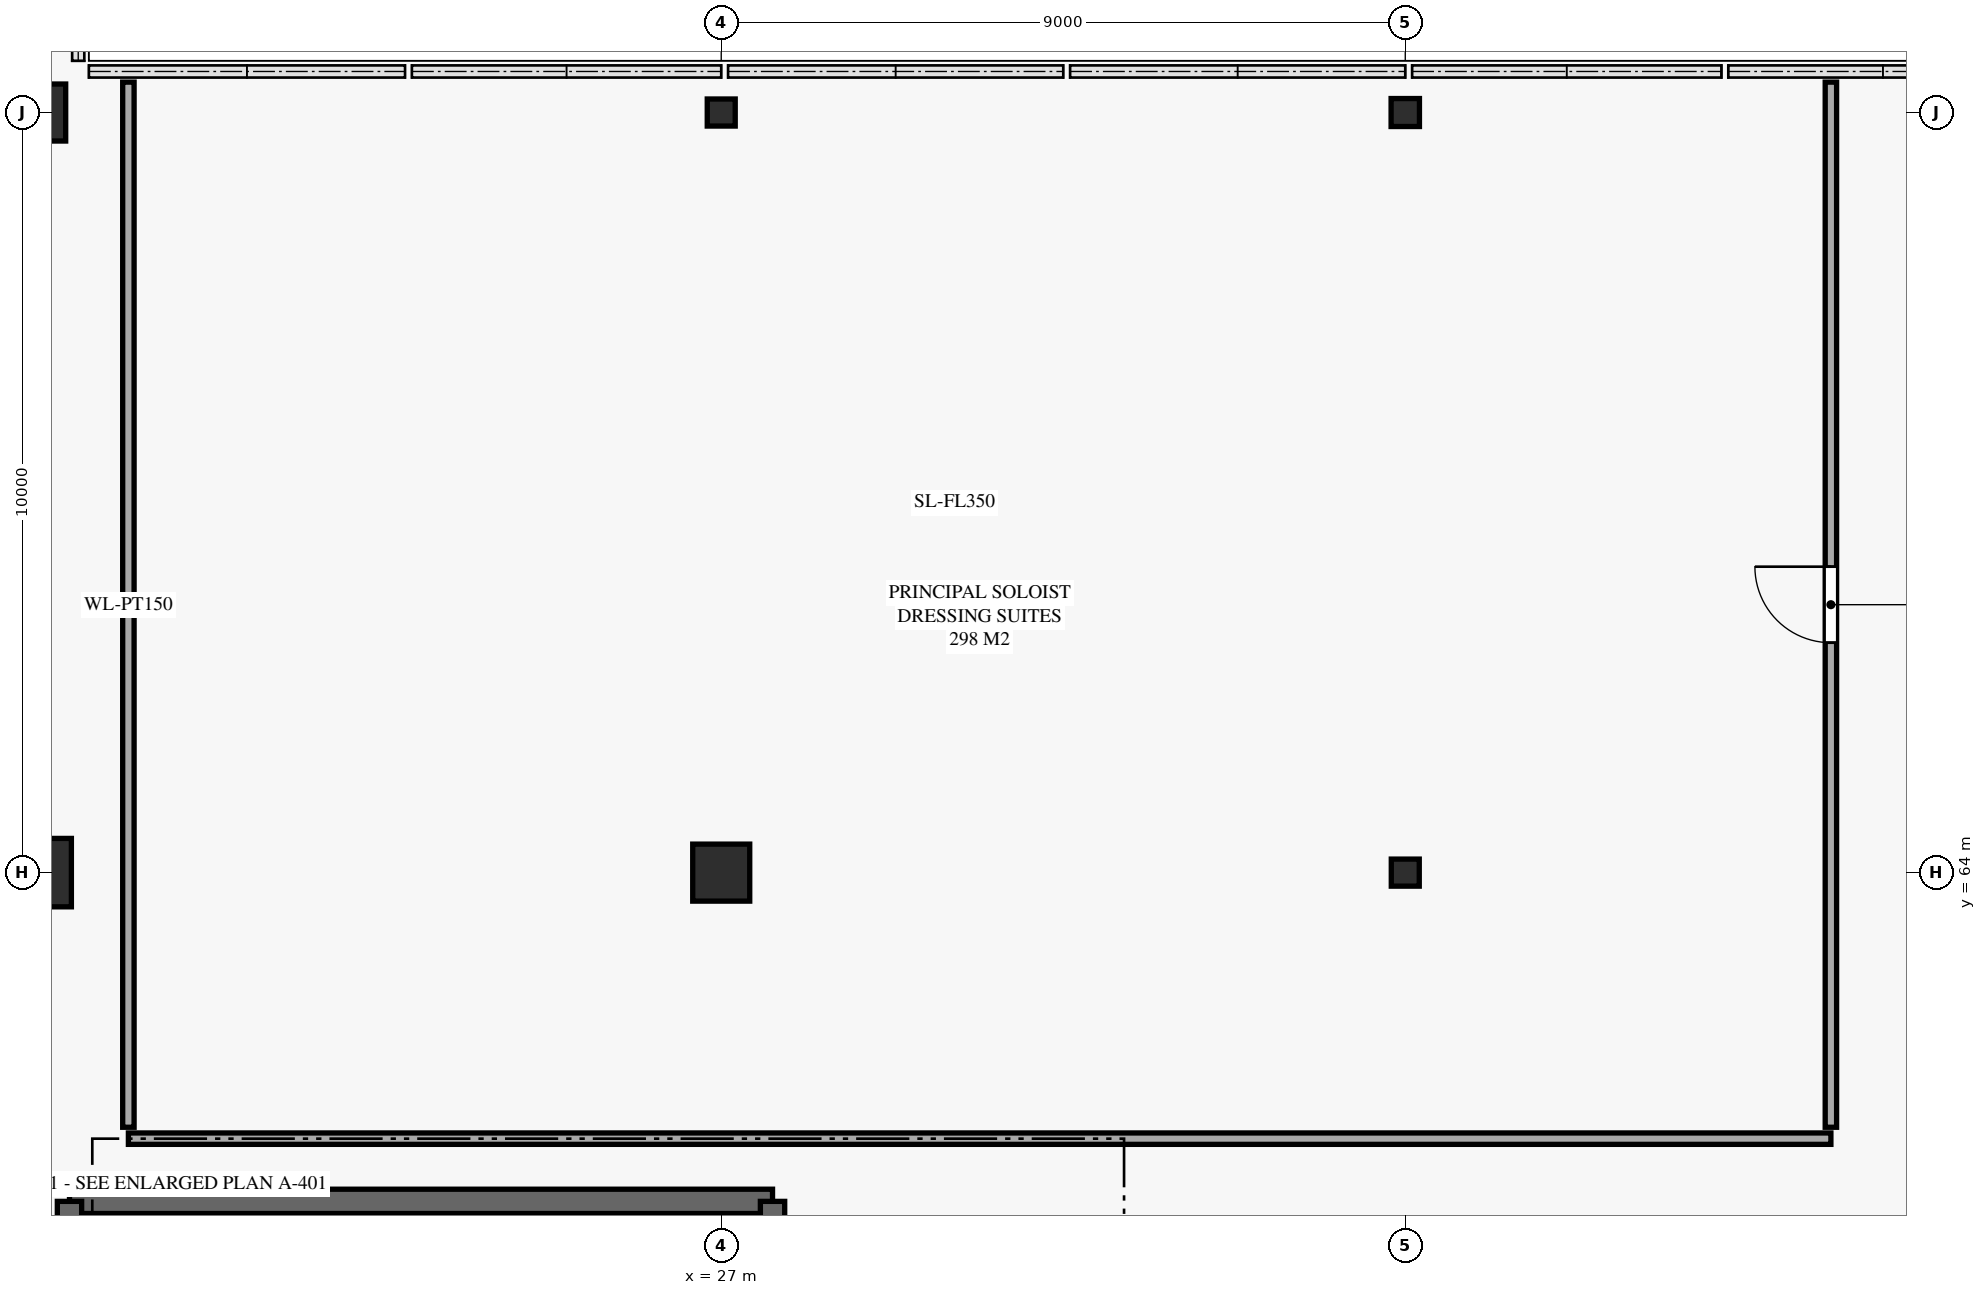
"""IFC4 building model, lengths in metres.
Left out: names, types, materials, properties, quantities, classifications, styles, units other than length and angle.
Written with IfcOpenShell. Run it as: python <this file> out.ifc"""

import sys

from ifc_helpers import new_model, si_unit, direction, frame, frame_2d, origin, origin_2d, place, context, subcontext, project, spatial, rectangle, i_section, extrude, element, fill, save


model = new_model("IFC4")
c1 = context("Model", 3, precision=1e-05, world=origin(), true_north=direction((0.0, 1.0)))
c2 = subcontext(c1, "Body", "Model", "MODEL_VIEW")
j1 = project(units=[si_unit("LENGTHUNIT", "METRE"), si_unit("PLANEANGLEUNIT", "RADIAN")], contexts=[c1])
p1 = place(None, origin())
s1 = spatial("IfcSite", under=j1, at=p1, CompositionType="ELEMENT")
p2 = place(p1, origin())
s2 = spatial("IfcBuilding", under=s1, at=p2, CompositionType="ELEMENT")
p3 = place(p2, origin())
s3 = spatial("IfcBuildingStorey", under=s2, at=p3, CompositionType="ELEMENT", Elevation=0.0)
p4 = place(p3, frame((18.0, 64.0, 0.0), z_axis=(0.0, 0.0, 1.0), x_axis=(1.0, 0.0, 0.0)))
e1 = element("IfcColumn", 1, at=p4, inside=s3, PredefinedType="COLUMN", context=c2, shape_type="SweptSolid", body=[
    extrude(rectangle(XDim=0.9, YDim=0.9, at=origin_2d()), origin(), (0.0, 0.0, 1.0), 5.0),
])
for number, where, z_axis, x_axis in (
    (2, (18.0, 74.0, 0.0), (0.0, 0.0, 1.0), (1.0, 0.0, 0.0)),
    (3, (27.0, 64.0, 0.0), (0.0, 0.0, 1.0), (1.0, 0.0, 0.0)),
):
    element("IfcColumn", number, at=place(p3, frame(where, z_axis=z_axis, x_axis=x_axis)), inside=s3, PredefinedType="COLUMN", context=c2, shape_type="SweptSolid", body=[
        extrude(rectangle(XDim=0.75, YDim=0.75, at=origin_2d()), origin(), (0.0, 0.0, 1.0), 5.0),
    ])
for number, where, z_axis, x_axis in (
    (4, (27.0, 74.0, 0.0), (0.0, 0.0, 1.0), (1.0, 0.0, 0.0)),
    (5, (36.0, 64.0, 0.0), (0.0, 0.0, 1.0), (1.0, 0.0, 0.0)),
):
    element("IfcColumn", number, at=place(p3, frame(where, z_axis=z_axis, x_axis=x_axis)), inside=s3, PredefinedType="COLUMN", context=c2, shape_type="SweptSolid", body=[
        extrude(i_section(OverallWidth=0.368, OverallDepth=0.356, WebThickness=0.011, FlangeThickness=0.018, FilletRadius=0.015, at=origin_2d()), origin(), (0.0, 0.0, 1.0), 5.0),
    ])
p5 = place(p3, frame((36.0, 74.0, 0.0), z_axis=(0.0, 0.0, 1.0), x_axis=(1.0, 0.0, 0.0)))
e6 = element("IfcColumn", 6, at=p5, inside=s3, PredefinedType="COLUMN", context=c2, shape_type="SweptSolid", body=[
    extrude(i_section(OverallWidth=0.373, OverallDepth=0.368, WebThickness=0.015, FlangeThickness=0.024, FilletRadius=0.015, at=origin_2d()), origin(), (0.0, 0.0, 1.0), 5.0),
])
p6 = place(p3, frame((27.675, 59.675, 0.0), z_axis=(0.0, 0.0, 1.0), x_axis=(-1.0, 0.0, 0.0)))
e7 = element("IfcWall", 7, at=p6, inside=s3, PredefinedType="SHEAR", context=c2, shape_type="SweptSolid", body=[
    extrude(rectangle(XDim=9.25, YDim=0.32, at=frame_2d((4.625, 0.0))), origin(), (0.0, 0.0, 1.0), 4.72),
])
p7 = place(p3, frame((18.425, 59.675, 0.0), z_axis=(0.0, 0.0, 1.0), x_axis=(0.0, -1.0, 0.0)))
e8 = element("IfcWall", 8, at=p7, inside=s3, PredefinedType="SHEAR", context=c2, shape_type="SweptSolid", body=[
    extrude(rectangle(XDim=5.05, YDim=0.32, at=frame_2d((2.525, 0.0))), origin(), (0.0, 0.0, 1.0), 4.72),
])
p8 = place(p7, frame((1.85, 0.0, 0.0)))
e9 = element("IfcOpeningElement", 9, at=p8, cuts=e8, PredefinedType="OPENING", context=c2, shape_type="SweptSolid", body=[
    extrude(rectangle(XDim=1.15, YDim=2.2, at=frame_2d((0.575, 1.1))), frame((0.0, 0.17, 0.0), z_axis=(0.0, -1.0, 0.0), x_axis=(1.0, 0.0, 0.0)), (0.0, 0.0, 1.0), 0.34),
])
p9 = place(p3, frame((27.675, 54.625, 0.0), z_axis=(0.0, 0.0, 1.0), x_axis=(0.0, 1.0, 0.0)))
e10 = element("IfcWall", 10, at=p9, inside=s3, PredefinedType="SHEAR", context=c2, shape_type="SweptSolid", body=[
    extrude(rectangle(XDim=5.05, YDim=0.32, at=frame_2d((2.525, 0.0))), origin(), (0.0, 0.0, 1.0), 4.72),
])
p10 = place(p3, frame((19.2, 60.5, 0.0), z_axis=(0.0, 0.0, 1.0), x_axis=(1.0, 0.0, 0.0)))
e11 = element("IfcWall", 11, at=p10, inside=s3, PredefinedType="PARTITIONING", context=c2, shape_type="SweptSolid", body=[
    extrude(rectangle(XDim=22.4, YDim=0.15, at=frame_2d((11.2, 0.0))), origin(), (0.0, 0.0, 1.0), 4.72),
])
p11 = place(p3, frame((19.2, 74.4, 0.0), z_axis=(0.0, 0.0, 1.0), x_axis=(0.0, -1.0, 0.0)))
e12 = element("IfcWall", 12, at=p11, inside=s3, PredefinedType="PARTITIONING", context=c2, shape_type="SweptSolid", body=[
    extrude(rectangle(XDim=13.75, YDim=0.15, at=frame_2d((6.875, 0.0))), origin(), (0.0, 0.0, 1.0), 4.72),
])
p12 = place(p3, frame((41.6, 60.65, 0.0), z_axis=(0.0, 0.0, 1.0), x_axis=(0.0, 1.0, 0.0)))
e13 = element("IfcWall", 13, at=p12, inside=s3, PredefinedType="PARTITIONING", context=c2, shape_type="SweptSolid", body=[
    extrude(rectangle(XDim=13.75, YDim=0.15, at=frame_2d((6.875, 0.0))), origin(), (0.0, 0.0, 1.0), 4.72),
])
p13 = place(p12, frame((6.375, 0.0, 0.0)))
e14 = element("IfcOpeningElement", 14, at=p13, cuts=e13, PredefinedType="OPENING", context=c2, shape_type="SweptSolid", body=[
    extrude(rectangle(XDim=1.0, YDim=2.15, at=frame_2d((0.5, 1.075))), frame((0.0, 0.085, 0.0), z_axis=(0.0, -1.0, 0.0), x_axis=(1.0, 0.0, 0.0)), (0.0, 0.0, 1.0), 0.17),
])
p14 = place(p13, origin())
e15 = element("IfcDoor", 15, at=p14, inside=s3, OperationType="SINGLE_SWING_RIGHT", PredefinedType="DOOR", context=c2, shape_type="SweptSolid", body=[
    extrude(rectangle(XDim=1.0, YDim=2.15, at=frame_2d((0.5, 1.075))), frame((0.0, 0.025, 0.0), z_axis=(0.0, -1.0, 0.0), x_axis=(1.0, 0.0, 0.0)), (0.0, 0.0, 1.0), 0.05),
])
fill(e14, e15)
save(model, sys.argv[1])
